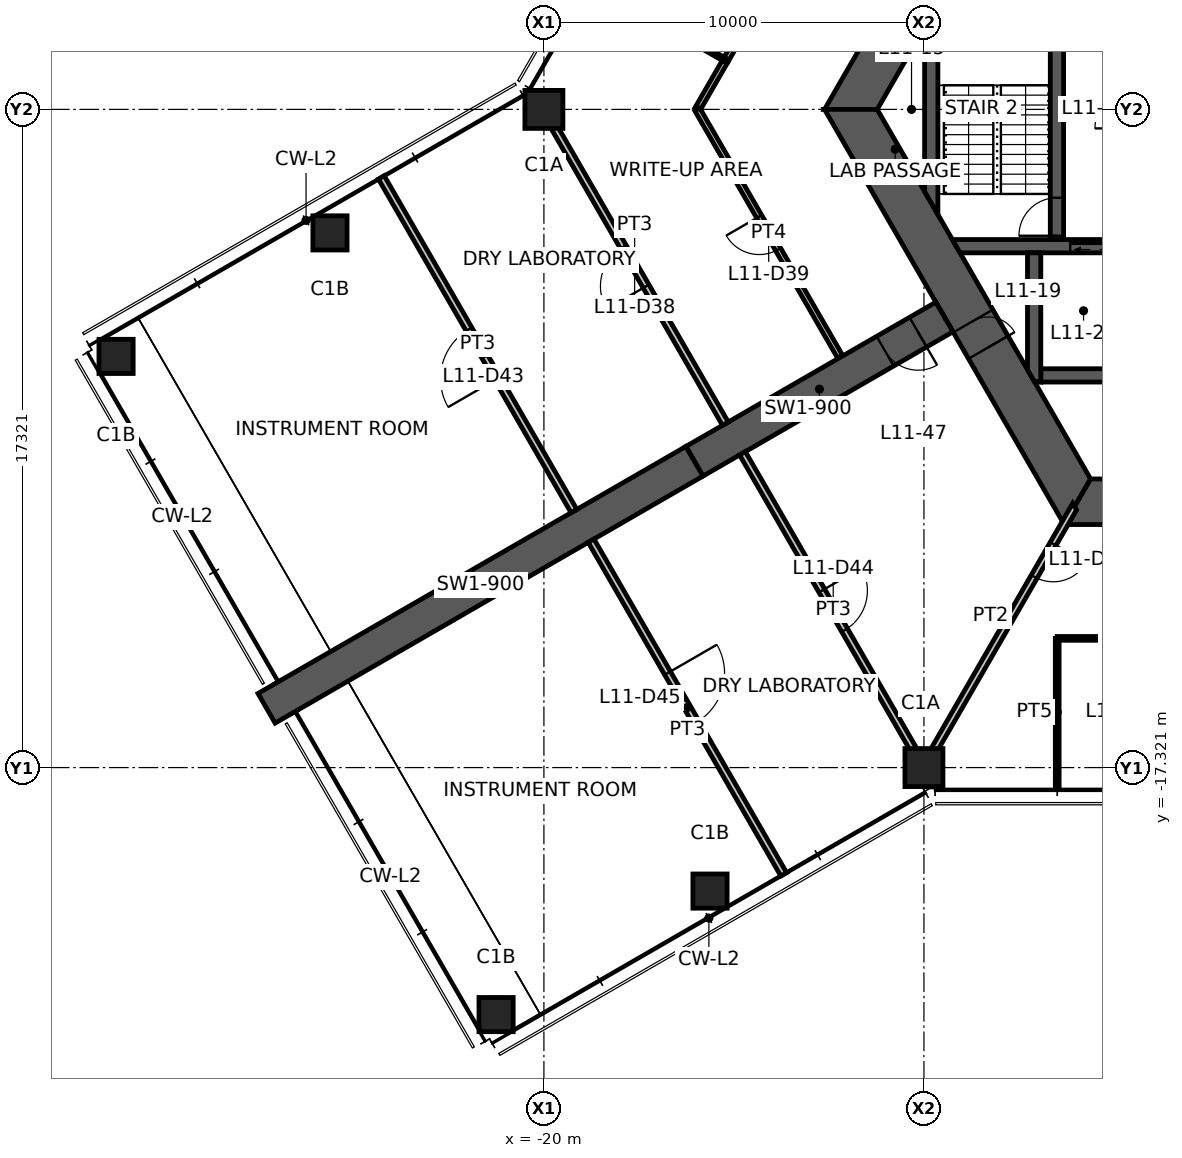
"""IFC4 building model, lengths in metres.
Left out: names, types, materials, properties, quantities, classifications, styles, units other than length and angle.
Written with IfcOpenShell. Run it as: python <this file> out.ifc"""

import sys

from ifc_helpers import new_model, si_unit, direction, frame, frame_2d, origin, origin_2d, place, context, subcontext, project, spatial, polyline, rectangle, hollow_rectangle, outline, extrude, element, fill, save


model = new_model("IFC4")
c1 = context("Model", 3, precision=1e-05, world=origin(), true_north=direction((0.0, 1.0)))
c2 = subcontext(c1, "Body", "Model", "MODEL_VIEW")
j1 = project(units=[si_unit("LENGTHUNIT", "METRE"), si_unit("PLANEANGLEUNIT", "RADIAN")], contexts=[c1])
p1 = place(None, origin())
s1 = spatial("IfcSite", under=j1, at=p1, CompositionType="ELEMENT")
p2 = place(p1, origin())
s2 = spatial("IfcBuilding", under=s1, at=p2, CompositionType="ELEMENT")
p3 = place(p2, frame((0.0, 0.0, 43.6)))
s3 = spatial("IfcBuildingStorey", under=s2, at=p3, CompositionType="ELEMENT", Elevation=43.6)
for number, where, z_axis, x_axis in (
    (1, (-20.0, 0.0, 0.0), (0.0, 0.0, 1.0), (1.0, 0.0, 0.0)),
    (2, (-10.0, -17.321, 0.0), (0.0, 0.0, 1.0), (1.0, 0.0, 0.0)),
):
    element("IfcColumn", number, at=place(p3, frame(where, z_axis=z_axis, x_axis=x_axis)), inside=s3, PredefinedType="COLUMN", context=c2, shape_type="SweptSolid", body=[
        extrude(hollow_rectangle(XDim=1.0, YDim=1.0, WallThickness=0.06, at=origin_2d()), origin(), (0.0, 0.0, 1.0), 4.2),
    ])
for number, where, z_axis, x_axis in (
    (3, (-25.629, -3.25, 0.0), (0.0, 0.0, 1.0), (1.0, 0.0, 0.0)),
    (4, (-31.258, -6.5, 0.0), (0.0, 0.0, 1.0), (1.0, 0.0, 0.0)),
    (5, (-15.629, -20.571, 0.0), (0.0, 0.0, 1.0), (1.0, 0.0, 0.0)),
    (6, (-21.258, -23.821, 0.0), (0.0, 0.0, 1.0), (1.0, 0.0, 0.0)),
):
    element("IfcColumn", number, at=place(p3, frame(where, z_axis=z_axis, x_axis=x_axis)), inside=s3, PredefinedType="COLUMN", context=c2, shape_type="SweptSolid", body=[
        extrude(hollow_rectangle(XDim=0.9, YDim=0.9, WallThickness=0.05, at=origin_2d()), origin(), (0.0, 0.0, 1.0), 4.2),
    ])
p4 = place(p3, frame((-5.961, 10.325, 0.0), z_axis=(0.0, 0.0, 1.0), x_axis=(-0.500004296715, -0.866022923061, 0.0)))
e7 = element("IfcWall", 7, at=p4, inside=s3, PredefinedType="SHEAR", context=c2, shape_type="SweptSolid", body=[
    extrude(outline(polyline([(-0.346, -0.6), (4.494, -0.6), (5.494, -0.6), (12.269, -0.6), (11.576, 0.6), (5.494, 0.6), (4.494, 0.6), (0.346, 0.6), (-0.346, -0.6)])), origin(), (0.0, 0.0, 1.0), 4.2),
])
p5 = place(p4, frame((4.494, 0.0, 0.0)))
e8 = element("IfcOpeningElement", 8, at=p5, cuts=e7, PredefinedType="OPENING", context=c2, shape_type="SweptSolid", body=[
    extrude(rectangle(XDim=1.0, YDim=2.1, at=frame_2d((0.5, 1.05))), frame((0.0, 0.61, 0.0), z_axis=(0.0, -1.0, 0.0), x_axis=(1.0, 0.0, 0.0)), (0.0, 0.0, 1.0), 1.22),
])
p6 = place(p3, frame((-11.922, 0.0, 0.0), z_axis=(0.0, 0.0, 1.0), x_axis=(0.500004296715, -0.866022923061, 0.0)))
e9 = element("IfcWall", 9, at=p6, inside=s3, PredefinedType="SHEAR", context=c2, shape_type="SweptSolid", body=[
    extrude(outline(polyline([(-0.346, -0.6), (6.431, -0.6), (7.231, -0.6), (12.269, -0.6), (11.576, 0.6), (7.231, 0.6), (6.431, 0.6), (0.346, 0.6), (-0.346, -0.6)])), origin(), (0.0, 0.0, 1.0), 4.2),
])
p7 = place(p6, frame((6.431, 0.0, 0.0)))
e10 = element("IfcOpeningElement", 10, at=p7, cuts=e9, PredefinedType="OPENING", context=c2, shape_type="SweptSolid", body=[
    extrude(rectangle(XDim=0.8, YDim=2.1, at=frame_2d((0.4, 1.05))), frame((0.0, 0.61, 0.0), z_axis=(0.0, -1.0, 0.0), x_axis=(1.0, 0.0, 0.0)), (0.0, 0.0, 1.0), 1.22),
])
p8 = place(p3, frame((-5.961, -10.325, 0.0), z_axis=(0.0, 0.0, 1.0), x_axis=(1.0, 0.0, 0.0)))
e11 = element("IfcWall", 11, at=p8, inside=s3, PredefinedType="SHEAR", context=c2, shape_type="SweptSolid", body=[
    extrude(outline(polyline([(-0.346, -0.6), (5.461, -0.6), (6.461, -0.6), (12.269, -0.6), (11.576, 0.6), (6.461, 0.6), (5.461, 0.6), (0.346, 0.6), (-0.346, -0.6)])), origin(), (0.0, 0.0, 1.0), 4.2),
])
p9 = place(p8, frame((5.461, 0.0, 0.0)))
e12 = element("IfcOpeningElement", 12, at=p9, cuts=e11, PredefinedType="OPENING", context=c2, shape_type="SweptSolid", body=[
    extrude(rectangle(XDim=1.0, YDim=2.1, at=frame_2d((0.5, 1.05))), frame((0.0, 0.61, 0.0), z_axis=(0.0, -1.0, 0.0), x_axis=(1.0, 0.0, 0.0)), (0.0, 0.0, 1.0), 1.22),
])
p10 = place(p3, frame((-9.461, -5.462, 0.0), z_axis=(0.0, 0.0, 1.0), x_axis=(-0.866019116917, -0.500010889016, 0.0)))
e13 = element("IfcWall", 13, at=p10, inside=s3, PredefinedType="SHEAR", context=c2, shape_type="SweptSolid", body=[
    extrude(rectangle(XDim=7.595, YDim=0.9, at=frame_2d((3.798, 0.0))), origin(), (0.0, 0.0, 1.0), 4.2),
])
p11 = place(p10, frame((0.8, 0.0, 0.0)))
e14 = element("IfcOpeningElement", 14, at=p11, cuts=e13, PredefinedType="OPENING", context=c2, shape_type="SweptSolid", body=[
    extrude(rectangle(XDim=1.0, YDim=2.1, at=frame_2d((0.5, 1.05))), frame((0.0, 0.46, 0.0), z_axis=(0.0, -1.0, 0.0), x_axis=(1.0, 0.0, 0.0)), (0.0, 0.0, 1.0), 0.92),
])
p12 = place(p3, frame((-16.039, -9.26, 0.0), z_axis=(0.0, 0.0, 1.0), x_axis=(-0.866024837091, -0.50000098154, 0.0)))
e15 = element("IfcWall", 15, at=p12, inside=s3, PredefinedType="SHEAR", context=c2, shape_type="SweptSolid", body=[
    extrude(rectangle(XDim=13.0, YDim=0.9, at=frame_2d((6.5, 0.0))), origin(), (0.0, 0.0, 1.0), 4.2),
])
p13 = place(p3, frame((-9.151, -3.6, 0.0), z_axis=(0.0, 0.0, 1.0), x_axis=(1.0, 0.0, 0.0)))
e16 = element("IfcWall", 16, at=p13, inside=s3, PredefinedType="SHEAR", context=c2, shape_type="SweptSolid", body=[
    extrude(outline(polyline([(0.101, -0.175), (3.001, -0.175), (4.301, -0.175), (7.726, -0.175), (7.726, 0.175), (4.301, 0.175), (3.001, 0.175), (-0.101, 0.175), (0.101, -0.175)])), origin(), (0.0, 0.0, 1.0), 4.2),
])
p14 = place(p13, frame((3.001, 0.0, 0.0)))
e17 = element("IfcOpeningElement", 17, at=p14, cuts=e16, PredefinedType="OPENING", context=c2, shape_type="SweptSolid", body=[
    extrude(rectangle(XDim=1.3, YDim=2.1, at=frame_2d((0.65, 1.05))), frame((0.0, 0.185, 0.0), z_axis=(0.0, -1.0, 0.0), x_axis=(1.0, 0.0, 0.0)), (0.0, 0.0, 1.0), 0.37),
])
p15 = place(p3, frame((-6.5, -3.425, 0.0), z_axis=(0.0, 0.0, 1.0), x_axis=(0.0, 1.0, 0.0)))
e18 = element("IfcWall", 18, at=p15, inside=s3, PredefinedType="SHEAR", context=c2, shape_type="SweptSolid", body=[
    extrude(rectangle(XDim=6.85, YDim=0.35, at=frame_2d((3.425, 0.0))), origin(), (0.0, 0.0, 1.0), 4.2),
])
p16 = place(p15, frame((0.1, 0.0, 0.0)))
e19 = element("IfcOpeningElement", 19, at=p16, cuts=e18, PredefinedType="OPENING", context=c2, shape_type="SweptSolid", body=[
    extrude(rectangle(XDim=1.0, YDim=2.1, at=frame_2d((0.5, 1.05))), frame((0.0, 0.185, 0.0), z_axis=(0.0, -1.0, 0.0), x_axis=(1.0, 0.0, 0.0)), (0.0, 0.0, 1.0), 0.37),
])
p17 = place(p3, frame((-6.925, -7.0, 0.0), z_axis=(0.0, 0.0, 1.0), x_axis=(1.0, 0.0, 0.0)))
e20 = element("IfcWall", 20, at=p17, inside=s3, PredefinedType="SHEAR", context=c2, shape_type="SweptSolid", body=[
    extrude(rectangle(XDim=2.25, YDim=0.35, at=frame_2d((1.125, 0.0))), origin(), (0.0, 0.0, 1.0), 4.2),
])
p18 = place(p3, frame((-7.1, -3.775, 0.0), z_axis=(0.0, 0.0, 1.0), x_axis=(0.0, -1.0, 0.0)))
e21 = element("IfcWall", 21, at=p18, inside=s3, PredefinedType="SHEAR", context=c2, shape_type="SweptSolid", body=[
    extrude(outline(polyline([(0.0, -0.175), (3.074, -0.175), (3.377, 0.0), (3.4, 0.175), (0.0, 0.175), (0.0, -0.175)])), origin(), (0.0, 0.0, 1.0), 4.2),
])
p19 = place(p3, frame((-9.808, -2.462, 0.0), z_axis=(0.0, 0.0, 1.0), x_axis=(0.0, 1.0, 0.0)))
e22 = element("IfcWall", 22, at=p19, inside=s3, PredefinedType="SHEAR", context=c2, shape_type="SweptSolid", body=[
    extrude(outline(polyline([(-0.303, -0.175), (5.228, -0.175), (4.621, 0.175), (0.303, 0.175), (-0.303, -0.175)])), origin(), (0.0, 0.0, 1.0), 4.2),
])
p20 = place(p3, frame((-6.035, -10.453, 0.0), z_axis=(0.0, 0.0, 1.0), x_axis=(-0.499993402427, -0.866029212861, 0.0)))
e23 = element("IfcWall", 23, at=p20, inside=s3, PredefinedType="PARTITIONING", context=c2, shape_type="SweptSolid", body=[
    extrude(outline(polyline([(-0.051, -0.087), (1.129, -0.087), (2.129, -0.087), (7.93, -0.087), (7.93, 0.087), (2.129, 0.087), (1.129, 0.087), (0.051, 0.087), (-0.051, -0.087)])), origin(), (0.0, 0.0, 1.0), 3.33),
])
p21 = place(p20, frame((1.129, 0.0, 0.0)))
e24 = element("IfcOpeningElement", 24, at=p21, cuts=e23, PredefinedType="OPENING", context=c2, shape_type="SweptSolid", body=[
    extrude(rectangle(XDim=1.0, YDim=2.1, at=frame_2d((0.5, 1.05))), frame((0.0, 0.098, 0.0), z_axis=(0.0, -1.0, 0.0), x_axis=(1.0, 0.0, 0.0)), (0.0, 0.0, 1.0), 0.195),
])
p22 = place(p3, frame((-15.225, -8.271, 0.0), z_axis=(0.0, 0.0, 1.0), x_axis=(-0.499993908199, 0.866028920859, 0.0)))
e25 = element("IfcWall", 25, at=p22, inside=s3, PredefinedType="PARTITIONING", context=c2, shape_type="SweptSolid", body=[
    extrude(rectangle(XDim=9.55, YDim=0.175, at=frame_2d((4.775, 0.0))), origin(), (0.0, 0.0, 1.0), 3.238),
])
p23 = place(p22, frame((4.175, 0.0, 0.0)))
e26 = element("IfcOpeningElement", 26, at=p23, cuts=e25, PredefinedType="OPENING", context=c2, shape_type="SweptSolid", body=[
    extrude(rectangle(XDim=1.2, YDim=2.1, at=frame_2d((0.6, 1.05))), frame((0.0, 0.098, 0.0), z_axis=(0.0, -1.0, 0.0), x_axis=(1.0, 0.0, 0.0)), (0.0, 0.0, 1.0), 0.195),
])
p24 = place(p3, frame((-15.222, 1.285, 0.0), z_axis=(0.0, 0.0, 1.0), x_axis=(0.499969057507, 0.866043267704, 0.0)))
e27 = element("IfcWall", 27, at=p24, inside=s3, PredefinedType="PARTITIONING", context=c2, shape_type="SweptSolid", body=[
    extrude(rectangle(XDim=3.257, YDim=0.15, at=frame_2d((1.628, 0.0))), origin(), (0.0, 0.0, 1.0), 3.23),
])
p25 = place(p3, frame((-15.964, 0.0, 0.0), z_axis=(0.0, 0.0, 1.0), x_axis=(0.499901701094, 0.866082149246, 0.0)))
e28 = element("IfcWall", 28, at=p25, inside=s3, PredefinedType="PARTITIONING", context=c2, shape_type="SweptSolid", body=[
    extrude(rectangle(XDim=1.493, YDim=0.15, at=frame_2d((0.747, 0.0))), origin(), (0.0, 0.0, 1.0), 3.23),
])
p26 = place(p3, frame((-12.208, -6.506, 0.0), z_axis=(0.0, 0.0, 1.0), x_axis=(-0.499984092097, 0.866034588021, 0.0)))
e29 = element("IfcWall", 29, at=p26, inside=s3, PredefinedType="PARTITIONING", context=c2, shape_type="SweptSolid", body=[
    extrude(rectangle(XDim=7.512, YDim=0.15, at=frame_2d((3.756, 0.0))), origin(), (0.0, 0.0, 1.0), 3.23),
])
p27 = place(p26, frame((3.256, 0.0, 0.0)))
e30 = element("IfcOpeningElement", 30, at=p27, cuts=e29, PredefinedType="OPENING", context=c2, shape_type="SweptSolid", body=[
    extrude(rectangle(XDim=1.0, YDim=2.1, at=frame_2d((0.5, 1.05))), frame((0.0, 0.085, 0.0), z_axis=(0.0, -1.0, 0.0), x_axis=(1.0, 0.0, 0.0)), (0.0, 0.0, 1.0), 0.17),
])
p28 = place(p3, frame((-15.217, 1.293, 0.0), z_axis=(0.0, 0.0, 1.0), x_axis=(-0.866583023507, 0.499032928142, 0.0)))
e31 = element("IfcWall", 31, at=p28, inside=s3, PredefinedType="PARTITIONING", context=c2, shape_type="SweptSolid", body=[
    extrude(rectangle(XDim=3.975, YDim=0.1, at=frame_2d((1.988, 0.0))), origin(), (0.0, 0.0, 1.0), 3.23),
])
p29 = place(p3, frame((-19.209, -10.571, 0.0), z_axis=(0.0, 0.0, 1.0), x_axis=(-0.500005203629, 0.866022399447, 0.0)))
e32 = element("IfcWall", 32, at=p29, inside=s3, PredefinedType="PARTITIONING", context=c2, shape_type="SweptSolid", body=[
    extrude(rectangle(XDim=10.14, YDim=0.175, at=frame_2d((5.07, 0.0))), origin(), (0.0, 0.0, 1.0), 4.03),
])
p30 = place(p29, frame((4.025, 0.0, 0.0)))
e33 = element("IfcOpeningElement", 33, at=p30, cuts=e32, PredefinedType="OPENING", context=c2, shape_type="SweptSolid", body=[
    extrude(rectangle(XDim=1.5, YDim=2.1, at=frame_2d((0.75, 1.05))), frame((0.0, 0.098, 0.0), z_axis=(0.0, -1.0, 0.0), x_axis=(1.0, 0.0, 0.0)), (0.0, 0.0, 1.0), 0.195),
])
p31 = place(p3, frame((-14.775, -9.05, 0.0), z_axis=(0.0, 0.0, 1.0), x_axis=(0.499993908199, -0.866028920859, 0.0)))
e34 = element("IfcWall", 34, at=p31, inside=s3, PredefinedType="PARTITIONING", context=c2, shape_type="SweptSolid", body=[
    extrude(rectangle(XDim=9.55, YDim=0.175, at=frame_2d((4.775, 0.0))), origin(), (0.0, 0.0, 1.0), 3.238),
])
p32 = place(p31, frame((4.175, 0.0, 0.0)))
e35 = element("IfcOpeningElement", 35, at=p32, cuts=e34, PredefinedType="OPENING", context=c2, shape_type="SweptSolid", body=[
    extrude(rectangle(XDim=1.2, YDim=2.1, at=frame_2d((0.6, 1.05))), frame((0.0, 0.098, 0.0), z_axis=(0.0, -1.0, 0.0), x_axis=(1.0, 0.0, 0.0)), (0.0, 0.0, 1.0), 0.195),
])
p33 = place(p3, frame((-18.759, -11.35, 0.0), z_axis=(0.0, 0.0, 1.0), x_axis=(0.500005203629, -0.866022399447, 0.0)))
e36 = element("IfcWall", 36, at=p33, inside=s3, PredefinedType="PARTITIONING", context=c2, shape_type="SweptSolid", body=[
    extrude(rectangle(XDim=10.14, YDim=0.175, at=frame_2d((5.07, 0.0))), origin(), (0.0, 0.0, 1.0), 4.03),
])
p34 = place(p33, frame((4.025, 0.0, 0.0)))
e37 = element("IfcOpeningElement", 37, at=p34, cuts=e36, PredefinedType="OPENING", context=c2, shape_type="SweptSolid", body=[
    extrude(rectangle(XDim=1.5, YDim=2.1, at=frame_2d((0.75, 1.05))), frame((0.0, 0.098, 0.0), z_axis=(0.0, -1.0, 0.0), x_axis=(1.0, 0.0, 0.0)), (0.0, 0.0, 1.0), 0.195),
])
p35 = place(p3, frame((-6.493, -17.801, 0.0), z_axis=(0.0, 0.0, 1.0), x_axis=(0.0, 1.0, 0.0)))
e38 = element("IfcWall", 38, at=p35, inside=s3, PredefinedType="PARTITIONING", context=c2, shape_type="SweptSolid", body=[
    extrude(rectangle(XDim=3.88, YDim=0.1, at=frame_2d((1.94, 0.0))), origin(), (0.0, 0.0, 1.0), 3.23),
])
p36 = place(p3, frame((-6.493, -13.92, 0.0), z_axis=(0.0, 0.0, 1.0), x_axis=(1.0, 0.0, 0.0)))
e39 = element("IfcWall", 39, at=p36, inside=s3, PredefinedType="PARTITIONING", context=c2, shape_type="SweptSolid", body=[
    extrude(rectangle(XDim=3.247, YDim=0.1, at=frame_2d((1.623, 0.0))), origin(), (0.0, 0.0, 1.0), 3.23),
])
p37 = place(p7, origin())
e40 = element("IfcDoor", 40, at=p37, inside=s3, OperationType="SINGLE_SWING_RIGHT", PredefinedType="DOOR", context=c2, shape_type="SweptSolid", body=[
    extrude(rectangle(XDim=0.8, YDim=2.1, at=frame_2d((0.4, 1.05))), frame((0.0, 0.025, 0.0), z_axis=(0.0, -1.0, 0.0), x_axis=(1.0, 0.0, 0.0)), (0.0, 0.0, 1.0), 0.05),
])
fill(e10, e40)
p38 = place(p16, origin())
e41 = element("IfcDoor", 41, at=p38, inside=s3, OperationType="SINGLE_SWING_LEFT", PredefinedType="DOOR", context=c2, shape_type="SweptSolid", body=[
    extrude(rectangle(XDim=1.0, YDim=2.1, at=frame_2d((0.5, 1.05))), frame((0.0, 0.025, 0.0), z_axis=(0.0, -1.0, 0.0), x_axis=(1.0, 0.0, 0.0)), (0.0, 0.0, 1.0), 0.05),
])
fill(e19, e41)
p39 = place(p11, origin())
e42 = element("IfcDoor", 42, at=p39, inside=s3, OperationType="SINGLE_SWING_LEFT", PredefinedType="DOOR", context=c2, shape_type="SweptSolid", body=[
    extrude(rectangle(XDim=1.0, YDim=2.1, at=frame_2d((0.5, 1.05))), frame((0.0, 0.025, 0.0), z_axis=(0.0, -1.0, 0.0), x_axis=(1.0, 0.0, 0.0)), (0.0, 0.0, 1.0), 0.05),
])
fill(e14, e42)
p40 = place(p21, origin())
e43 = element("IfcDoor", 43, at=p40, inside=s3, OperationType="SINGLE_SWING_LEFT", PredefinedType="DOOR", context=c2, shape_type="SweptSolid", body=[
    extrude(rectangle(XDim=1.0, YDim=2.1, at=frame_2d((0.5, 1.05))), frame((0.0, 0.025, 0.0), z_axis=(0.0, -1.0, 0.0), x_axis=(1.0, 0.0, 0.0)), (0.0, 0.0, 1.0), 0.05),
])
fill(e24, e43)
p41 = place(p23, origin())
e44 = element("IfcDoor", 44, at=p41, inside=s3, OperationType="DOUBLE_DOOR_SINGLE_SWING", PredefinedType="DOOR", context=c2, shape_type="SweptSolid", body=[
    extrude(rectangle(XDim=1.2, YDim=2.1, at=frame_2d((0.6, 1.05))), frame((0.0, 0.025, 0.0), z_axis=(0.0, -1.0, 0.0), x_axis=(1.0, 0.0, 0.0)), (0.0, 0.0, 1.0), 0.05),
])
fill(e26, e44)
p42 = place(p27, origin())
e45 = element("IfcDoor", 45, at=p42, inside=s3, OperationType="SINGLE_SWING_RIGHT", PredefinedType="DOOR", context=c2, shape_type="SweptSolid", body=[
    extrude(rectangle(XDim=1.0, YDim=2.1, at=frame_2d((0.5, 1.05))), frame((0.0, 0.025, 0.0), z_axis=(0.0, -1.0, 0.0), x_axis=(1.0, 0.0, 0.0)), (0.0, 0.0, 1.0), 0.05),
])
fill(e30, e45)
p43 = place(p30, origin())
e46 = element("IfcDoor", 46, at=p43, inside=s3, OperationType="DOUBLE_DOOR_SINGLE_SWING", PredefinedType="DOOR", context=c2, shape_type="SweptSolid", body=[
    extrude(rectangle(XDim=1.5, YDim=2.1, at=frame_2d((0.75, 1.05))), frame((0.0, 0.025, 0.0), z_axis=(0.0, -1.0, 0.0), x_axis=(1.0, 0.0, 0.0)), (0.0, 0.0, 1.0), 0.05),
])
fill(e33, e46)
p44 = place(p32, origin())
e47 = element("IfcDoor", 47, at=p44, inside=s3, OperationType="DOUBLE_DOOR_SINGLE_SWING", PredefinedType="DOOR", context=c2, shape_type="SweptSolid", body=[
    extrude(rectangle(XDim=1.2, YDim=2.1, at=frame_2d((0.6, 1.05))), frame((0.0, 0.025, 0.0), z_axis=(0.0, -1.0, 0.0), x_axis=(1.0, 0.0, 0.0)), (0.0, 0.0, 1.0), 0.05),
])
fill(e35, e47)
p45 = place(p34, origin())
e48 = element("IfcDoor", 48, at=p45, inside=s3, OperationType="DOUBLE_DOOR_SINGLE_SWING", PredefinedType="DOOR", context=c2, shape_type="SweptSolid", body=[
    extrude(rectangle(XDim=1.5, YDim=2.1, at=frame_2d((0.75, 1.05))), frame((0.0, 0.025, 0.0), z_axis=(0.0, -1.0, 0.0), x_axis=(1.0, 0.0, 0.0)), (0.0, 0.0, 1.0), 0.05),
])
fill(e37, e48)
p46 = place(p14, origin())
e49 = element("IfcDoor", 49, at=p46, inside=s3, OperationType="DOUBLE_DOOR_SLIDING", PredefinedType="DOOR", context=c2, shape_type="SweptSolid", body=[
    extrude(rectangle(XDim=1.3, YDim=2.1, at=frame_2d((0.65, 1.05))), frame((0.0, 0.025, 0.0), z_axis=(0.0, -1.0, 0.0), x_axis=(1.0, 0.0, 0.0)), (0.0, 0.0, 1.0), 0.05),
])
fill(e17, e49)
save(model, sys.argv[1])
